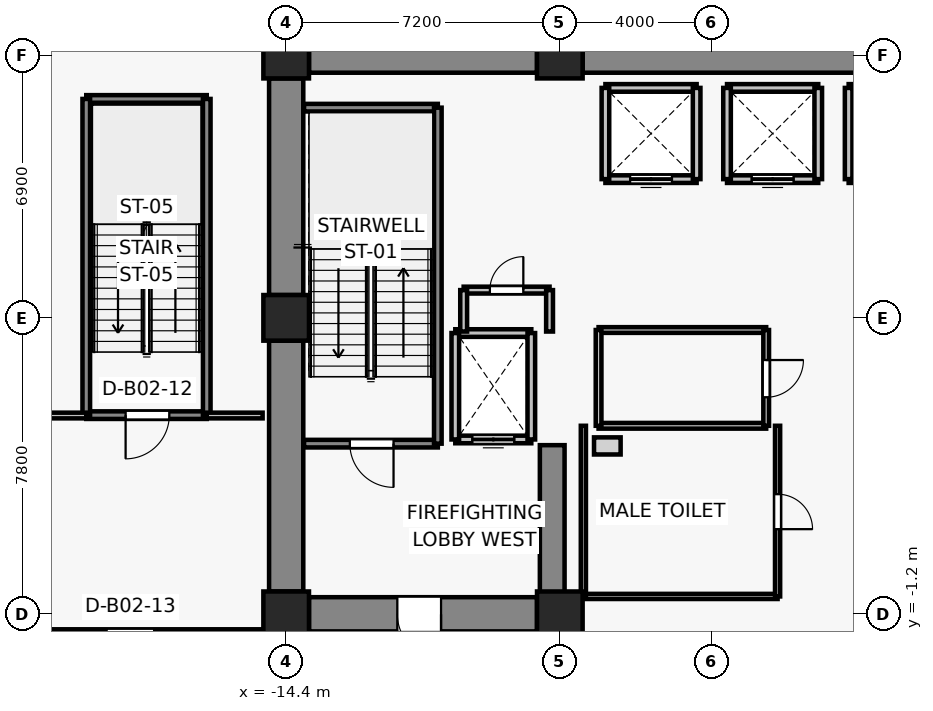
"""IFC4 building model, lengths in metres.
Left out: names, types, materials, properties, quantities, classifications, styles, units other than length and angle.
Written with IfcOpenShell. Run it as: python <this file> out.ifc"""

import sys

from ifc_helpers import new_model, si_unit, direction, frame, frame_2d, origin, origin_2d, place, context, subcontext, project, spatial, rectangle, extrude, source, transform, mapped, element, fill, save


model = new_model("IFC4")
c1 = context("Model", 3, precision=1e-05, world=origin(), true_north=direction((0.0, 1.0)))
c2 = subcontext(c1, "Body", "Model", "MODEL_VIEW")
j1 = project(units=[si_unit("LENGTHUNIT", "METRE"), si_unit("PLANEANGLEUNIT", "RADIAN")], contexts=[c1])
p1 = place(None, origin())
s1 = spatial("IfcSite", under=j1, at=p1, CompositionType="ELEMENT")
p2 = place(p1, origin())
s2 = spatial("IfcBuilding", under=s1, at=p2, CompositionType="ELEMENT")
p3 = place(p2, frame((0.0, 0.0, -8.8)))
s3 = spatial("IfcBuildingStorey", under=s2, at=p3, CompositionType="ELEMENT", Elevation=-8.8)
for number, where, z_axis, x_axis in (
    (1, (-14.4, -1.2, 0.0), (0.0, 0.0, 1.0), (1.0, 0.0, 0.0)),
    (2, (-7.2, -1.2, 0.0), (0.0, 0.0, 1.0), (1.0, 0.0, 0.0)),
    (3, (-14.4, 6.6, 0.0), (0.0, 0.0, 1.0), (1.0, 0.0, 0.0)),
    (4, (-14.4, 13.5, 0.0), (0.0, 0.0, 1.0), (1.0, 0.0, 0.0)),
    (5, (-7.2, 13.5, 0.0), (0.0, 0.0, 1.0), (1.0, 0.0, 0.0)),
):
    element("IfcColumn", number, at=place(p3, frame(where, z_axis=z_axis, x_axis=x_axis)), inside=s3, PredefinedType="COLUMN", context=c2, shape_type="SweptSolid", body=[
        extrude(rectangle(XDim=1.2, YDim=1.2, at=origin_2d()), origin(), (0.0, 0.0, 1.0), 4.4),
    ])
p4 = place(p3, frame((-13.8, 13.5, 0.0), z_axis=(0.0, 0.0, 1.0), x_axis=(1.0, 0.0, 0.0)))
e6 = element("IfcWall", 6, at=p4, inside=s3, PredefinedType="SHEAR", context=c2, shape_type="SweptSolid", body=[
    extrude(rectangle(XDim=6.0, YDim=0.9, at=frame_2d((3.0, 0.0))), origin(), (0.0, 0.0, 1.0), 4.12),
])
p5 = place(p3, frame((-6.6, 13.5, 0.0), z_axis=(0.0, 0.0, 1.0), x_axis=(1.0, 0.0, 0.0)))
e7 = element("IfcWall", 7, at=p5, inside=s3, PredefinedType="SHEAR", context=c2, shape_type="SweptSolid", body=[
    extrude(rectangle(XDim=13.2, YDim=0.9, at=frame_2d((6.6, 0.0))), origin(), (0.0, 0.0, 1.0), 4.12),
])
p6 = place(p3, frame((-14.4, -0.6, 0.0), z_axis=(0.0, 0.0, 1.0), x_axis=(0.0, 1.0, 0.0)))
e8 = element("IfcWall", 8, at=p6, inside=s3, PredefinedType="SHEAR", context=c2, shape_type="SweptSolid", body=[
    extrude(rectangle(XDim=6.6, YDim=0.9, at=frame_2d((3.3, 0.0))), origin(), (0.0, 0.0, 1.0), 4.12),
])
p7 = place(p3, frame((-14.4, 7.2, 0.0), z_axis=(0.0, 0.0, 1.0), x_axis=(0.0, 1.0, 0.0)))
e9 = element("IfcWall", 9, at=p7, inside=s3, PredefinedType="SHEAR", context=c2, shape_type="SweptSolid", body=[
    extrude(rectangle(XDim=5.7, YDim=0.9, at=frame_2d((2.85, 0.0))), origin(), (0.0, 0.0, 1.0), 4.12),
])
p8 = place(p3, frame((-7.8, -1.2, 0.0), z_axis=(0.0, 0.0, 1.0), x_axis=(-1.0, 0.0, 0.0)))
e10 = element("IfcWall", 10, at=p8, inside=s3, PredefinedType="SHEAR", context=c2, shape_type="SweptSolid", body=[
    extrude(rectangle(XDim=6.0, YDim=0.9, at=frame_2d((3.0, 0.0))), origin(), (0.0, 0.0, 1.0), 4.12),
])
p9 = place(p8, frame((2.525, 0.0, 0.0)))
e11 = element("IfcOpeningElement", 11, at=p9, cuts=e10, PredefinedType="OPENING", context=c2, shape_type="SweptSolid", body=[
    extrude(rectangle(XDim=1.15, YDim=2.15, at=frame_2d((0.575, 1.075))), frame((0.0, 0.46, 0.0), z_axis=(0.0, -1.0, 0.0), x_axis=(1.0, 0.0, 0.0)), (0.0, 0.0, 1.0), 0.92),
])
p10 = place(p3, frame((-7.4, -0.75, 0.0), z_axis=(0.0, 0.0, 1.0), x_axis=(0.0, 1.0, 0.0)))
e12 = element("IfcWall", 12, at=p10, inside=s3, PredefinedType="SHEAR", context=c2, shape_type="SweptSolid", body=[
    extrude(rectangle(XDim=4.0, YDim=0.65, at=frame_2d((2.0, 0.0))), origin(), (0.0, 0.0, 1.0), 4.12),
])
p11 = place(p3, frame((-7.95, 3.4, 0.0), z_axis=(0.0, 0.0, 1.0), x_axis=(-1.0, 0.0, 0.0)))
e13 = element("IfcWall", 13, at=p11, inside=s3, PredefinedType="SOLIDWALL", context=c2, shape_type="SweptSolid", body=[
    extrude(rectangle(XDim=2.0, YDim=0.2, at=frame_2d((1.0, 0.0))), origin(), (0.0, 0.0, 1.0), 4.12),
])
p12 = place(p11, frame((0.45, 0.0, 0.0)))
e14 = element("IfcOpeningElement", 14, at=p12, cuts=e13, PredefinedType="OPENING", context=c2, shape_type="SweptSolid", body=[
    extrude(rectangle(XDim=1.1, YDim=2.2, at=frame_2d((0.55, 1.1))), frame((0.0, 0.11, 0.0), z_axis=(0.0, -1.0, 0.0), x_axis=(1.0, 0.0, 0.0)), (0.0, 0.0, 1.0), 0.22),
])
p13 = place(p3, frame((-9.95, 6.2, 0.0), z_axis=(0.0, 0.0, 1.0), x_axis=(1.0, 0.0, 0.0)))
e15 = element("IfcWall", 15, at=p13, inside=s3, PredefinedType="SOLIDWALL", context=c2, shape_type="SweptSolid", body=[
    extrude(rectangle(XDim=2.0, YDim=0.2, at=frame_2d((1.0, 0.0))), origin(), (0.0, 0.0, 1.0), 4.12),
])
for number, where, z_axis, x_axis in (
    (16, (-9.95, 3.4, 0.0), (0.0, 0.0, 1.0), (0.0, 1.0, 0.0)),
    (17, (-7.95, 6.2, 0.0), (0.0, 0.0, 1.0), (0.0, -1.0, 0.0)),
):
    element("IfcWall", number, at=place(p3, frame(where, z_axis=z_axis, x_axis=x_axis)), inside=s3, PredefinedType="SOLIDWALL", context=c2, shape_type="SweptSolid", body=[
        extrude(rectangle(XDim=2.8, YDim=0.2, at=frame_2d((1.4, 0.0))), origin(), (0.0, 0.0, 1.0), 4.12),
    ])
p14 = place(p3, frame((-3.6, 10.25, 0.0), z_axis=(0.0, 0.0, 1.0), x_axis=(-1.0, 0.0, 0.0)))
e18 = element("IfcWall", 18, at=p14, inside=s3, PredefinedType="SOLIDWALL", context=c2, shape_type="SweptSolid", body=[
    extrude(rectangle(XDim=2.4, YDim=0.2, at=frame_2d((1.2, 0.0))), origin(), (0.0, 0.0, 1.0), 4.12),
])
p15 = place(p14, frame((0.65, 0.0, 0.0)))
e19 = element("IfcOpeningElement", 19, at=p15, cuts=e18, PredefinedType="OPENING", context=c2, shape_type="SweptSolid", body=[
    extrude(rectangle(XDim=1.1, YDim=2.2, at=frame_2d((0.55, 1.1))), frame((0.0, 0.11, 0.0), z_axis=(0.0, -1.0, 0.0), x_axis=(1.0, 0.0, 0.0)), (0.0, 0.0, 1.0), 0.22),
])
for number, where, z_axis, x_axis in (
    (20, (-6.0, 12.65, 0.0), (0.0, 0.0, 1.0), (1.0, 0.0, 0.0)),
    (21, (-6.0, 10.25, 0.0), (0.0, 0.0, 1.0), (0.0, 1.0, 0.0)),
    (22, (-3.6, 12.65, 0.0), (0.0, 0.0, 1.0), (0.0, -1.0, 0.0)),
):
    element("IfcWall", number, at=place(p3, frame(where, z_axis=z_axis, x_axis=x_axis)), inside=s3, PredefinedType="SOLIDWALL", context=c2, shape_type="SweptSolid", body=[
        extrude(rectangle(XDim=2.4, YDim=0.2, at=frame_2d((1.2, 0.0))), origin(), (0.0, 0.0, 1.0), 4.12),
    ])
p16 = place(p3, frame((-0.4, 10.25, 0.0), z_axis=(0.0, 0.0, 1.0), x_axis=(-1.0, 0.0, 0.0)))
e23 = element("IfcWall", 23, at=p16, inside=s3, PredefinedType="SOLIDWALL", context=c2, shape_type="SweptSolid", body=[
    extrude(rectangle(XDim=2.4, YDim=0.2, at=frame_2d((1.2, 0.0))), origin(), (0.0, 0.0, 1.0), 4.12),
])
p17 = place(p16, frame((0.65, 0.0, 0.0)))
e24 = element("IfcOpeningElement", 24, at=p17, cuts=e23, PredefinedType="OPENING", context=c2, shape_type="SweptSolid", body=[
    extrude(rectangle(XDim=1.1, YDim=2.2, at=frame_2d((0.55, 1.1))), frame((0.0, 0.11, 0.0), z_axis=(0.0, -1.0, 0.0), x_axis=(1.0, 0.0, 0.0)), (0.0, 0.0, 1.0), 0.22),
])
p18 = place(p3, frame((-2.8, 12.65, 0.0), z_axis=(0.0, 0.0, 1.0), x_axis=(1.0, 0.0, 0.0)))
e25 = element("IfcWall", 25, at=p18, inside=s3, PredefinedType="SOLIDWALL", context=c2, shape_type="SweptSolid", body=[
    extrude(rectangle(XDim=2.4, YDim=0.2, at=frame_2d((1.2, 0.0))), origin(), (0.0, 0.0, 1.0), 4.12),
])
for number, where, z_axis, x_axis in (
    (26, (-2.8, 10.25, 0.0), (0.0, 0.0, 1.0), (0.0, 1.0, 0.0)),
    (27, (-0.4, 12.65, 0.0), (0.0, 0.0, 1.0), (0.0, -1.0, 0.0)),
):
    element("IfcWall", number, at=place(p3, frame(where, z_axis=z_axis, x_axis=x_axis)), inside=s3, PredefinedType="SOLIDWALL", context=c2, shape_type="SweptSolid", body=[
        extrude(rectangle(XDim=2.4, YDim=0.2, at=frame_2d((1.2, 0.0))), origin(), (0.0, 0.0, 1.0), 4.12),
    ])
p19 = place(p3, frame((2.8, 10.25, 0.0), z_axis=(0.0, 0.0, 1.0), x_axis=(-1.0, 0.0, 0.0)))
e28 = element("IfcWall", 28, at=p19, inside=s3, PredefinedType="SOLIDWALL", context=c2, shape_type="SweptSolid", body=[
    extrude(rectangle(XDim=2.4, YDim=0.2, at=frame_2d((1.2, 0.0))), origin(), (0.0, 0.0, 1.0), 4.12),
])
p20 = place(p19, frame((0.65, 0.0, 0.0)))
e29 = element("IfcOpeningElement", 29, at=p20, cuts=e28, PredefinedType="OPENING", context=c2, shape_type="SweptSolid", body=[
    extrude(rectangle(XDim=1.1, YDim=2.2, at=frame_2d((0.55, 1.1))), frame((0.0, 0.11, 0.0), z_axis=(0.0, -1.0, 0.0), x_axis=(1.0, 0.0, 0.0)), (0.0, 0.0, 1.0), 0.22),
])
p21 = place(p3, frame((0.4, 12.65, 0.0), z_axis=(0.0, 0.0, 1.0), x_axis=(1.0, 0.0, 0.0)))
e30 = element("IfcWall", 30, at=p21, inside=s3, PredefinedType="SOLIDWALL", context=c2, shape_type="SweptSolid", body=[
    extrude(rectangle(XDim=2.4, YDim=0.2, at=frame_2d((1.2, 0.0))), origin(), (0.0, 0.0, 1.0), 4.12),
])
p22 = place(p3, frame((0.4, 10.25, 0.0), z_axis=(0.0, 0.0, 1.0), x_axis=(0.0, 1.0, 0.0)))
e31 = element("IfcWall", 31, at=p22, inside=s3, PredefinedType="SOLIDWALL", context=c2, shape_type="SweptSolid", body=[
    extrude(rectangle(XDim=2.4, YDim=0.2, at=frame_2d((1.2, 0.0))), origin(), (0.0, 0.0, 1.0), 4.12),
])
p23 = place(p3, frame((-10.41, 3.29, 0.0), z_axis=(0.0, 0.0, 1.0), x_axis=(-1.0, 0.0, 0.0)))
e32 = element("IfcWall", 32, at=p23, inside=s3, PredefinedType="SOLIDWALL", context=c2, shape_type="SweptSolid", body=[
    extrude(rectangle(XDim=3.52, YDim=0.2, at=frame_2d((1.76, 0.0))), origin(), (0.0, 0.0, 1.0), 4.12),
])
p24 = place(p23, frame((1.165, 0.0, 0.0)))
e33 = element("IfcOpeningElement", 33, at=p24, cuts=e32, PredefinedType="OPENING", context=c2, shape_type="SweptSolid", body=[
    extrude(rectangle(XDim=1.15, YDim=2.15, at=frame_2d((0.575, 1.075))), frame((0.0, 0.11, 0.0), z_axis=(0.0, -1.0, 0.0), x_axis=(1.0, 0.0, 0.0)), (0.0, 0.0, 1.0), 0.22),
])
p25 = place(p3, frame((-13.93, 12.13, 0.0), z_axis=(0.0, 0.0, 1.0), x_axis=(1.0, 0.0, 0.0)))
e34 = element("IfcWall", 34, at=p25, inside=s3, PredefinedType="SOLIDWALL", context=c2, shape_type="SweptSolid", body=[
    extrude(rectangle(XDim=3.52, YDim=0.2, at=frame_2d((1.76, 0.0))), origin(), (0.0, 0.0, 1.0), 4.12),
])
p26 = place(p3, frame((-10.41, 12.13, 0.0), z_axis=(0.0, 0.0, 1.0), x_axis=(0.0, -1.0, 0.0)))
e35 = element("IfcWall", 35, at=p26, inside=s3, PredefinedType="SOLIDWALL", context=c2, shape_type="SweptSolid", body=[
    extrude(rectangle(XDim=8.84, YDim=0.2, at=frame_2d((4.42, 0.0))), origin(), (0.0, 0.0, 1.0), 4.12),
])
p27 = place(p3, frame((-9.73, 7.33, 0.0), z_axis=(0.0, 0.0, 1.0), x_axis=(1.0, 0.0, 0.0)))
e36 = element("IfcWall", 36, at=p27, inside=s3, PredefinedType="PARTITIONING", context=c2, shape_type="SweptSolid", body=[
    extrude(rectangle(XDim=2.26, YDim=0.18, at=frame_2d((1.13, 0.0))), origin(), (0.0, 0.0, 1.0), 3.41),
])
p28 = place(p27, frame((0.69, 0.0, 0.0)))
e37 = element("IfcOpeningElement", 37, at=p28, cuts=e36, PredefinedType="OPENING", context=c2, shape_type="SweptSolid", body=[
    extrude(rectangle(XDim=0.88, YDim=2.1, at=frame_2d((0.44, 1.05))), frame((0.0, 0.1, 0.0), z_axis=(0.0, -1.0, 0.0), x_axis=(1.0, 0.0, 0.0)), (0.0, 0.0, 1.0), 0.2),
])
p29 = place(p3, frame((-9.73, 6.24, 0.0), z_axis=(0.0, 0.0, 1.0), x_axis=(0.0, 1.0, 0.0)))
e38 = element("IfcWall", 38, at=p29, inside=s3, PredefinedType="PARTITIONING", context=c2, shape_type="SweptSolid", body=[
    extrude(rectangle(XDim=1.09, YDim=0.18, at=frame_2d((0.545, 0.0))), origin(), (0.0, 0.0, 1.0), 4.12),
])
p30 = place(p3, frame((-7.47, 7.33, 0.0), z_axis=(0.0, 0.0, 1.0), x_axis=(0.0, -1.0, 0.0)))
e39 = element("IfcWall", 39, at=p30, inside=s3, PredefinedType="PARTITIONING", context=c2, shape_type="SweptSolid", body=[
    extrude(rectangle(XDim=1.09, YDim=0.18, at=frame_2d((0.545, 0.0))), origin(), (0.0, 0.0, 1.0), 3.41),
])
for number, where, z_axis, x_axis in (
    (40, (-1.77, 3.76, 0.0), (0.0, 0.0, 1.0), (-1.0, 0.0, 0.0)),
    (41, (-6.18, 6.28, 0.0), (0.0, 0.0, 1.0), (1.0, 0.0, 0.0)),
):
    element("IfcWall", number, at=place(p3, frame(where, z_axis=z_axis, x_axis=x_axis)), inside=s3, PredefinedType="PARTITIONING", context=c2, shape_type="SweptSolid", body=[
        extrude(rectangle(XDim=4.41, YDim=0.15, at=frame_2d((2.205, 0.0))), origin(), (0.0, 0.0, 1.0), 4.12),
    ])
p31 = place(p3, frame((-6.18, 3.76, 0.0), z_axis=(0.0, 0.0, 1.0), x_axis=(0.0, 1.0, 0.0)))
e42 = element("IfcWall", 42, at=p31, inside=s3, PredefinedType="PARTITIONING", context=c2, shape_type="SweptSolid", body=[
    extrude(rectangle(XDim=2.52, YDim=0.15, at=frame_2d((1.26, 0.0))), origin(), (0.0, 0.0, 1.0), 4.12),
])
p32 = place(p3, frame((-1.77, 6.28, 0.0), z_axis=(0.0, 0.0, 1.0), x_axis=(0.0, -1.0, 0.0)))
e43 = element("IfcWall", 43, at=p32, inside=s3, PredefinedType="PARTITIONING", context=c2, shape_type="SweptSolid", body=[
    extrude(rectangle(XDim=2.52, YDim=0.15, at=frame_2d((1.26, 0.0))), origin(), (0.0, 0.0, 1.0), 4.12),
])
p33 = place(p32, frame((0.79, 0.0, 0.0)))
e44 = element("IfcOpeningElement", 44, at=p33, cuts=e43, PredefinedType="OPENING", context=c2, shape_type="SweptSolid", body=[
    extrude(rectangle(XDim=0.98, YDim=2.15, at=frame_2d((0.49, 1.075))), frame((0.0, 0.085, 0.0), z_axis=(0.0, -1.0, 0.0), x_axis=(1.0, 0.0, 0.0)), (0.0, 0.0, 1.0), 0.17),
])
p34 = place(p3, frame((-1.47, -0.73, 0.0), z_axis=(0.0, 0.0, 1.0), x_axis=(-1.0, 0.0, 0.0)))
e45 = element("IfcWall", 45, at=p34, inside=s3, PredefinedType="PARTITIONING", context=c2, shape_type="SweptSolid", body=[
    extrude(rectangle(XDim=5.11, YDim=0.135, at=frame_2d((2.555, 0.0))), origin(), (0.0, 0.0, 1.0), 4.12),
])
p35 = place(p3, frame((-6.58, -0.73, 0.0), z_axis=(0.0, 0.0, 1.0), x_axis=(0.0, 1.0, 0.0)))
e46 = element("IfcWall", 46, at=p35, inside=s3, PredefinedType="PARTITIONING", context=c2, shape_type="SweptSolid", body=[
    extrude(rectangle(XDim=4.49, YDim=0.135, at=frame_2d((2.245, 0.0))), origin(), (0.0, 0.0, 1.0), 3.493),
])
p36 = place(p3, frame((-1.47, 3.76, 0.0), z_axis=(0.0, 0.0, 1.0), x_axis=(0.0, -1.0, 0.0)))
e47 = element("IfcWall", 47, at=p36, inside=s3, PredefinedType="PARTITIONING", context=c2, shape_type="SweptSolid", body=[
    extrude(rectangle(XDim=4.49, YDim=0.135, at=frame_2d((2.245, 0.0))), origin(), (0.0, 0.0, 1.0), 3.493),
])
p37 = place(p36, frame((1.8, 0.0, 0.0)))
e48 = element("IfcOpeningElement", 48, at=p37, cuts=e47, PredefinedType="OPENING", context=c2, shape_type="SweptSolid", body=[
    extrude(rectangle(XDim=0.92, YDim=2.1, at=frame_2d((0.46, 1.05))), frame((0.0, 0.077, 0.0), z_axis=(0.0, -1.0, 0.0), x_axis=(1.0, 0.0, 0.0)), (0.0, 0.0, 1.0), 0.155),
])
p38 = place(p3, frame((-16.49, 4.04, 0.0), z_axis=(0.0, 0.0, 1.0), x_axis=(-1.0, 0.0, 0.0)))
e49 = element("IfcWall", 49, at=p38, inside=s3, PredefinedType="SOLIDWALL", context=c2, shape_type="SweptSolid", body=[
    extrude(rectangle(XDim=3.17, YDim=0.2, at=frame_2d((1.585, 0.0))), origin(), (0.0, 0.0, 1.0), 4.12),
])
p39 = place(p38, frame((0.985, 0.0, 0.0)))
e50 = element("IfcOpeningElement", 50, at=p39, cuts=e49, PredefinedType="OPENING", context=c2, shape_type="SweptSolid", body=[
    extrude(rectangle(XDim=1.15, YDim=2.15, at=frame_2d((0.575, 1.075))), frame((0.0, 0.11, 0.0), z_axis=(0.0, -1.0, 0.0), x_axis=(1.0, 0.0, 0.0)), (0.0, 0.0, 1.0), 0.22),
])
p40 = place(p3, frame((-19.66, 12.36, 0.0), z_axis=(0.0, 0.0, 1.0), x_axis=(1.0, 0.0, 0.0)))
e51 = element("IfcWall", 51, at=p40, inside=s3, PredefinedType="SOLIDWALL", context=c2, shape_type="SweptSolid", body=[
    extrude(rectangle(XDim=3.17, YDim=0.2, at=frame_2d((1.585, 0.0))), origin(), (0.0, 0.0, 1.0), 4.12),
])
for number, where, z_axis, x_axis in (
    (52, (-19.66, 4.04, 0.0), (0.0, 0.0, 1.0), (0.0, 1.0, 0.0)),
    (53, (-16.49, 12.36, 0.0), (0.0, 0.0, 1.0), (0.0, -1.0, 0.0)),
):
    element("IfcWall", number, at=place(p3, frame(where, z_axis=z_axis, x_axis=x_axis)), inside=s3, PredefinedType="SOLIDWALL", context=c2, shape_type="SweptSolid", body=[
        extrude(rectangle(XDim=8.32, YDim=0.2, at=frame_2d((4.16, 0.0))), origin(), (0.0, 0.0, 1.0), 4.12),
    ])
p41 = place(p3, frame((-15.02, -1.67, 0.0), z_axis=(0.0, 0.0, 1.0), x_axis=(-1.0, 0.0, 0.0)))
e54 = element("IfcWall", 54, at=p41, inside=s3, PredefinedType="PARTITIONING", context=c2, shape_type="SweptSolid", body=[
    extrude(rectangle(XDim=5.76, YDim=0.15, at=frame_2d((2.88, 0.0))), origin(), (0.0, 0.0, 1.0), 4.12),
])
p42 = place(p41, frame((2.855, 0.0, 0.0)))
e55 = element("IfcOpeningElement", 55, at=p42, cuts=e54, PredefinedType="OPENING", context=c2, shape_type="SweptSolid", body=[
    extrude(rectangle(XDim=1.25, YDim=2.15, at=frame_2d((0.625, 1.075))), frame((0.0, 0.085, 0.0), z_axis=(0.0, -1.0, 0.0), x_axis=(1.0, 0.0, 0.0)), (0.0, 0.0, 1.0), 0.17),
])
p43 = place(p3, frame((-22.28, 4.03, 0.0), z_axis=(0.0, 0.0, 1.0), x_axis=(1.0, 0.0, 0.0)))
e56 = element("IfcWall", 56, at=p43, inside=s3, PredefinedType="PARTITIONING", context=c2, shape_type="SweptSolid", body=[
    extrude(rectangle(XDim=2.62, YDim=0.15, at=frame_2d((1.31, 0.0))), origin(), (0.0, 0.0, 1.0), 3.41),
])
p44 = place(p3, frame((-16.49, 4.03, 0.0), z_axis=(0.0, 0.0, 1.0), x_axis=(1.0, 0.0, 0.0)))
e57 = element("IfcWall", 57, at=p44, inside=s3, PredefinedType="PARTITIONING", context=c2, shape_type="SweptSolid", body=[
    extrude(rectangle(XDim=1.47, YDim=0.15, at=frame_2d((0.735, 0.0))), origin(), (0.0, 0.0, 1.0), 4.12),
])
m1 = source(origin(), c2, "Body", "SweptSolid", [
    extrude(rectangle(XDim=1.1, YDim=2.2, at=frame_2d((0.55, 1.1))), frame((0.0, 0.025, 0.0), z_axis=(0.0, -1.0, 0.0), x_axis=(1.0, 0.0, 0.0)), (0.0, 0.0, 1.0), 0.05),
])
p45 = place(p12, origin())
e58 = element("IfcDoor", 58, at=p45, inside=s3, OperationType="DOUBLE_DOOR_SLIDING", PredefinedType="DOOR", context=c2, shape_type="MappedRepresentation", body=[
    mapped(m1, transform((0.0, 0.0, 0.0), x_axis=(1.0, 0.0, 0.0), y_axis=(0.0, 1.0, 0.0), z_axis=(0.0, 0.0, 1.0), scale=1.0)),
])
fill(e14, e58)
p46 = place(p15, origin())
e59 = element("IfcDoor", 59, at=p46, inside=s3, OperationType="DOUBLE_DOOR_SLIDING", PredefinedType="DOOR", context=c2, shape_type="MappedRepresentation", body=[
    mapped(m1, transform((0.0, 0.0, 0.0), x_axis=(1.0, 0.0, 0.0), y_axis=(0.0, 1.0, 0.0), z_axis=(0.0, 0.0, 1.0), scale=1.0)),
])
fill(e19, e59)
p47 = place(p17, origin())
e60 = element("IfcDoor", 60, at=p47, inside=s3, OperationType="DOUBLE_DOOR_SLIDING", PredefinedType="DOOR", context=c2, shape_type="MappedRepresentation", body=[
    mapped(m1, transform((0.0, 0.0, 0.0), x_axis=(1.0, 0.0, 0.0), y_axis=(0.0, 1.0, 0.0), z_axis=(0.0, 0.0, 1.0), scale=1.0)),
])
fill(e24, e60)
m2 = source(origin(), c2, "Body", "SweptSolid", [
    extrude(rectangle(XDim=1.15, YDim=2.15, at=frame_2d((0.575, 1.075))), frame((0.0, 0.025, 0.0), z_axis=(0.0, -1.0, 0.0), x_axis=(1.0, 0.0, 0.0)), (0.0, 0.0, 1.0), 0.05),
])
p48 = place(p24, origin())
e61 = element("IfcDoor", 61, at=p48, inside=s3, OperationType="SINGLE_SWING_LEFT", PredefinedType="DOOR", context=c2, shape_type="MappedRepresentation", body=[
    mapped(m2, transform((0.0, 0.0, 0.0), x_axis=(1.0, 0.0, 0.0), y_axis=(0.0, 1.0, 0.0), z_axis=(0.0, 0.0, 1.0), scale=1.0)),
])
fill(e33, e61)
p49 = place(p9, origin())
e62 = element("IfcDoor", 62, at=p49, inside=s3, OperationType="SINGLE_SWING_LEFT", PredefinedType="DOOR", context=c2, shape_type="MappedRepresentation", body=[
    mapped(m2, transform((0.0, 0.0, 0.0), x_axis=(1.0, 0.0, 0.0), y_axis=(0.0, 1.0, 0.0), z_axis=(0.0, 0.0, 1.0), scale=1.0)),
])
fill(e11, e62)
m3 = source(origin(), c2, "Body", "SweptSolid", [
    extrude(rectangle(XDim=0.98, YDim=2.15, at=frame_2d((0.49, 1.075))), frame((0.0, 0.025, 0.0), z_axis=(0.0, -1.0, 0.0), x_axis=(1.0, 0.0, 0.0)), (0.0, 0.0, 1.0), 0.05),
])
p50 = place(p33, origin())
e63 = element("IfcDoor", 63, at=p50, inside=s3, OperationType="SINGLE_SWING_LEFT", PredefinedType="DOOR", context=c2, shape_type="MappedRepresentation", body=[
    mapped(m3, transform((0.0, 0.0, 0.0), x_axis=(1.0, 0.0, 0.0), y_axis=(0.0, 1.0, 0.0), z_axis=(0.0, 0.0, 1.0), scale=1.0)),
])
fill(e44, e63)
m4 = source(origin(), c2, "Body", "SweptSolid", [
    extrude(rectangle(XDim=0.92, YDim=2.1, at=frame_2d((0.46, 1.05))), frame((0.0, 0.025, 0.0), z_axis=(0.0, -1.0, 0.0), x_axis=(1.0, 0.0, 0.0)), (0.0, 0.0, 1.0), 0.05),
])
p51 = place(p37, origin())
e64 = element("IfcDoor", 64, at=p51, inside=s3, OperationType="SINGLE_SWING_RIGHT", PredefinedType="DOOR", context=c2, shape_type="MappedRepresentation", body=[
    mapped(m4, transform((0.0, 0.0, 0.0), x_axis=(1.0, 0.0, 0.0), y_axis=(0.0, 1.0, 0.0), z_axis=(0.0, 0.0, 1.0), scale=1.0)),
])
fill(e48, e64)
p52 = place(p39, origin())
e65 = element("IfcDoor", 65, at=p52, inside=s3, OperationType="SINGLE_SWING_RIGHT", PredefinedType="DOOR", context=c2, shape_type="MappedRepresentation", body=[
    mapped(m2, transform((0.0, 0.0, 0.0), x_axis=(1.0, 0.0, 0.0), y_axis=(0.0, 1.0, 0.0), z_axis=(0.0, 0.0, 1.0), scale=1.0)),
])
fill(e50, e65)
m5 = source(origin(), c2, "Body", "SweptSolid", [
    extrude(rectangle(XDim=1.25, YDim=2.15, at=frame_2d((0.625, 1.075))), frame((0.0, 0.025, 0.0), z_axis=(0.0, -1.0, 0.0), x_axis=(1.0, 0.0, 0.0)), (0.0, 0.0, 1.0), 0.05),
])
p53 = place(p42, origin())
e66 = element("IfcDoor", 66, at=p53, inside=s3, OperationType="SINGLE_SWING_LEFT", PredefinedType="DOOR", context=c2, shape_type="MappedRepresentation", body=[
    mapped(m5, transform((0.0, 0.0, 0.0), x_axis=(1.0, 0.0, 0.0), y_axis=(0.0, 1.0, 0.0), z_axis=(0.0, 0.0, 1.0), scale=1.0)),
])
fill(e55, e66)
m6 = source(origin(), c2, "Body", "SweptSolid", [
    extrude(rectangle(XDim=0.88, YDim=2.1, at=frame_2d((0.44, 1.05))), frame((0.0, 0.025, 0.0), z_axis=(0.0, -1.0, 0.0), x_axis=(1.0, 0.0, 0.0)), (0.0, 0.0, 1.0), 0.05),
])
p54 = place(p28, origin())
e67 = element("IfcDoor", 67, at=p54, inside=s3, OperationType="SINGLE_SWING_RIGHT", PredefinedType="DOOR", context=c2, shape_type="MappedRepresentation", body=[
    mapped(m6, transform((0.0, 0.0, 0.0), x_axis=(1.0, 0.0, 0.0), y_axis=(0.0, 1.0, 0.0), z_axis=(0.0, 0.0, 1.0), scale=1.0)),
])
fill(e37, e67)
save(model, sys.argv[1])
